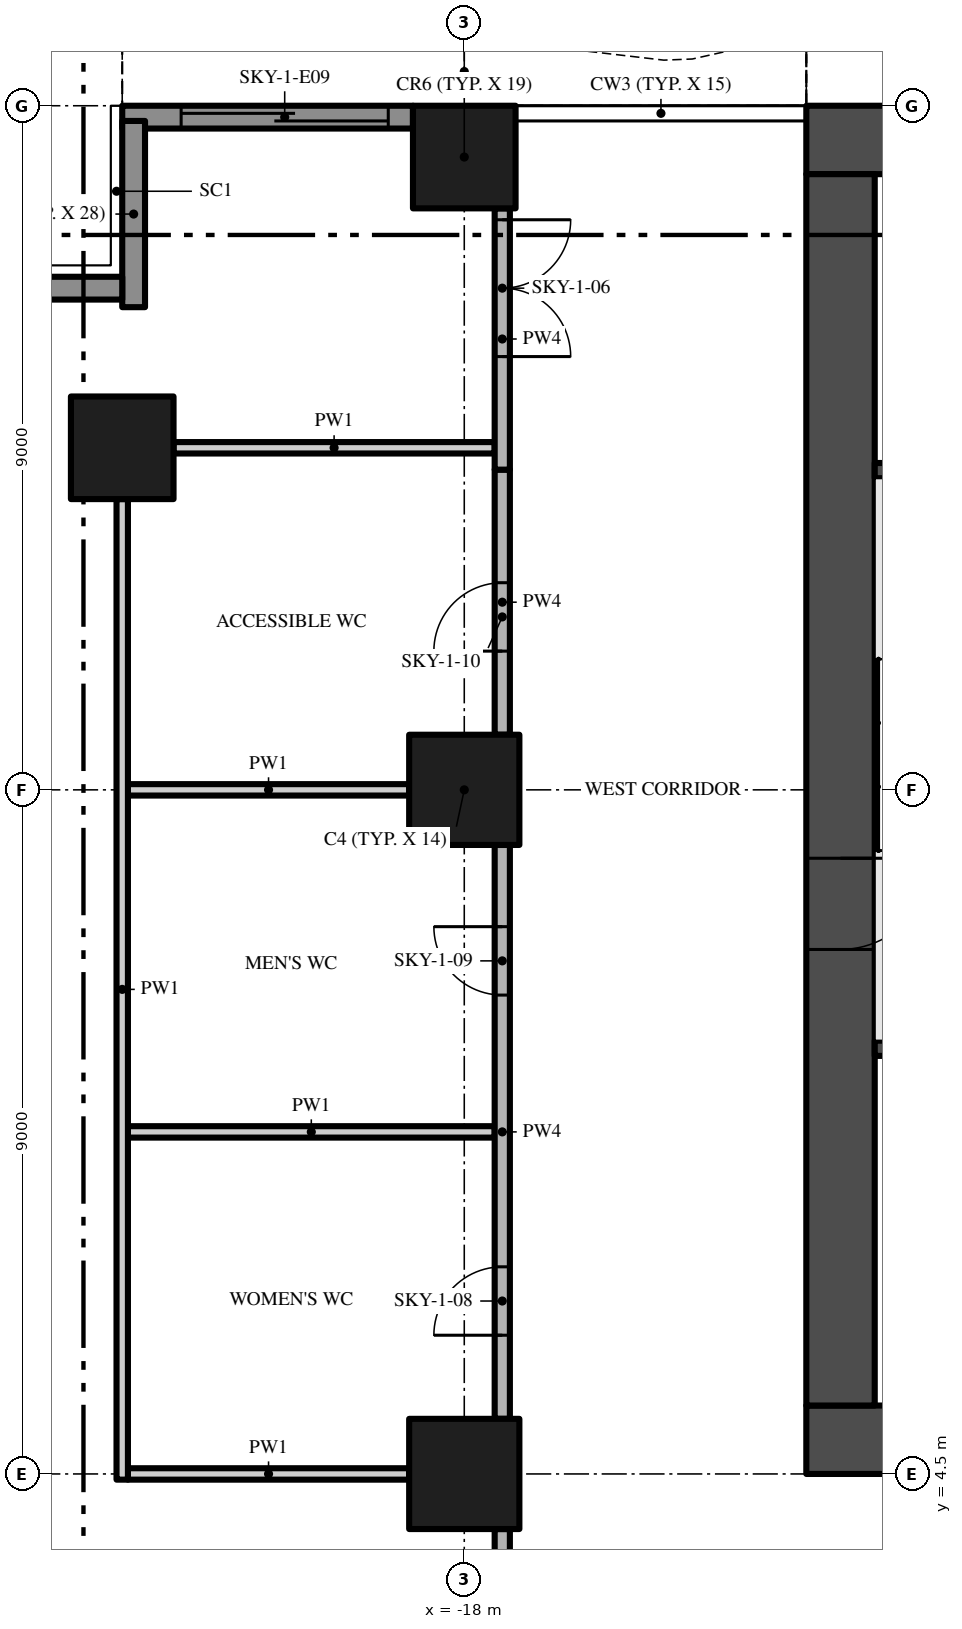
"""IFC4 building model, lengths in metres.
Left out: names, types, materials, properties, quantities, classifications, styles, units other than length and angle.
Written with IfcOpenShell. Run it as: python <this file> out.ifc"""

import sys

from ifc_helpers import new_model, si_unit, direction, frame, frame_2d, origin, origin_2d, place, context, subcontext, project, spatial, polyline, rectangle, outline, extrude, element, fill, save


model = new_model("IFC4")
c1 = context("Model", 3, precision=1e-05, world=origin(), true_north=direction((0.0, 1.0)))
c2 = subcontext(c1, "Body", "Model", "MODEL_VIEW")
j1 = project(units=[si_unit("LENGTHUNIT", "METRE"), si_unit("PLANEANGLEUNIT", "RADIAN")], contexts=[c1])
p1 = place(None, origin())
s1 = spatial("IfcSite", under=j1, at=p1, CompositionType="ELEMENT")
p2 = place(p1, origin())
s2 = spatial("IfcBuilding", under=s1, at=p2, CompositionType="ELEMENT")
p3 = place(p2, frame((0.0, 0.0, 64.4)))
s3 = spatial("IfcBuildingStorey", under=s2, at=p3, CompositionType="ELEMENT", Elevation=64.4)
p4 = place(p3, frame((-13.5, 4.95, -0.3), z_axis=(0.0, 0.0, 1.0), x_axis=(1.0, 0.0, 0.0)))
e1 = element("IfcWall", 1, at=p4, inside=s3, PredefinedType="SHEAR", context=c2, shape_type="SweptSolid", body=[
    extrude(rectangle(XDim=27.0, YDim=0.9, at=frame_2d((13.5, 0.0))), origin(), (0.0, 0.0, 1.0), 5.0),
])
p5 = place(p4, frame((12.0, 0.0, 0.3)))
e2 = element("IfcOpeningElement", 2, at=p5, cuts=e1, PredefinedType="OPENING", context=c2, shape_type="SweptSolid", body=[
    extrude(rectangle(XDim=3.0, YDim=2.4, at=frame_2d((1.5, 1.2))), frame((0.0, 0.46, 0.0), z_axis=(0.0, -1.0, 0.0), x_axis=(1.0, 0.0, 0.0)), (0.0, 0.0, 1.0), 0.92),
])
p6 = place(p4, frame((4.9, 0.0, 0.3)))
e3 = element("IfcOpeningElement", 3, at=p6, cuts=e1, PredefinedType="OPENING", context=c2, shape_type="SweptSolid", body=[
    extrude(rectangle(XDim=1.2, YDim=2.2, at=frame_2d((0.6, 1.1))), frame((0.0, 0.46, 0.0), z_axis=(0.0, -1.0, 0.0), x_axis=(1.0, 0.0, 0.0)), (0.0, 0.0, 1.0), 0.92),
])
p7 = place(p4, frame((20.75, 0.0, 0.3)))
e4 = element("IfcOpeningElement", 4, at=p7, cuts=e1, PredefinedType="OPENING", context=c2, shape_type="SweptSolid", body=[
    extrude(rectangle(XDim=1.5, YDim=2.2, at=frame_2d((0.75, 1.1))), frame((0.0, 0.46, 0.0), z_axis=(0.0, -1.0, 0.0), x_axis=(1.0, 0.0, 0.0)), (0.0, 0.0, 1.0), 0.92),
])
p8 = place(p4, frame((17.4, 0.0, 0.3)))
e5 = element("IfcOpeningElement", 5, at=p8, cuts=e1, PredefinedType="OPENING", context=c2, shape_type="SweptSolid", body=[
    extrude(rectangle(XDim=1.2, YDim=2.2, at=frame_2d((0.6, 1.1))), frame((0.0, 0.46, 0.0), z_axis=(0.0, -1.0, 0.0), x_axis=(1.0, 0.0, 0.0)), (0.0, 0.0, 1.0), 0.92),
])
p9 = place(p3, frame((13.5, 22.05, -0.3), z_axis=(0.0, 0.0, 1.0), x_axis=(-1.0, 0.0, 0.0)))
e6 = element("IfcWall", 6, at=p9, inside=s3, PredefinedType="SHEAR", context=c2, shape_type="SweptSolid", body=[
    extrude(rectangle(XDim=27.0, YDim=0.9, at=frame_2d((13.5, 0.0))), origin(), (0.0, 0.0, 1.0), 5.0),
])
p10 = place(p3, frame((-13.05, 21.6, -0.3), z_axis=(0.0, 0.0, 1.0), x_axis=(0.0, -1.0, 0.0)))
e7 = element("IfcWall", 7, at=p10, inside=s3, PredefinedType="SHEAR", context=c2, shape_type="SweptSolid", body=[
    extrude(rectangle(XDim=16.2, YDim=0.9, at=frame_2d((8.1, 0.0))), origin(), (0.0, 0.0, 1.0), 5.0),
])
p11 = place(p10, frame((9.0, 0.0, 0.3)))
e8 = element("IfcOpeningElement", 8, at=p11, cuts=e7, PredefinedType="OPENING", context=c2, shape_type="SweptSolid", body=[
    extrude(rectangle(XDim=1.2, YDim=2.2, at=frame_2d((0.6, 1.1))), frame((0.0, 0.46, 0.0), z_axis=(0.0, -1.0, 0.0), x_axis=(1.0, 0.0, 0.0)), (0.0, 0.0, 1.0), 0.92),
])
p12 = place(p3, frame((-18.0, 13.5, 0.0), z_axis=(0.0, 0.0, 1.0), x_axis=(1.0, 0.0, 0.0)))
e9 = element("IfcColumn", 9, at=p12, inside=s3, PredefinedType="COLUMN", context=c2, shape_type="SweptSolid", body=[
    extrude(rectangle(XDim=1.45, YDim=1.45, at=origin_2d()), origin(), (0.0, 0.0, 1.0), 4.7),
])
p13 = place(p3, frame((-18.0, 21.825, 0.0), z_axis=(0.0, 0.0, 1.0), x_axis=(1.0, 0.0, 0.0)))
e10 = element("IfcColumn", 10, at=p13, inside=s3, PredefinedType="COLUMN", context=c2, shape_type="SweptSolid", body=[
    extrude(rectangle(XDim=1.35, YDim=1.35, at=origin_2d()), origin(), (0.0, 0.0, 1.0), 4.7),
])
p14 = place(p3, frame((-18.0, 4.5, 0.0), z_axis=(0.0, 0.0, 1.0), x_axis=(1.0, 0.0, 0.0)))
e11 = element("IfcColumn", 11, at=p14, inside=s3, PredefinedType="COLUMN", context=c2, shape_type="SweptSolid", body=[
    extrude(rectangle(XDim=1.45, YDim=1.45, at=origin_2d()), origin(), (0.0, 0.0, 1.0), 4.7),
])
p15 = place(p3, frame((-22.5, 18.0, 0.0), z_axis=(0.0, 0.0, 1.0), x_axis=(1.0, 0.0, 0.0)))
e12 = element("IfcColumn", 12, at=p15, inside=s3, PredefinedType="COLUMN", context=c2, shape_type="SweptSolid", body=[
    extrude(rectangle(XDim=1.35, YDim=1.35, at=origin_2d()), origin(), (0.0, 0.0, 1.0), 4.7),
])
p16 = place(p3, frame((-22.5, 22.35, 0.0), z_axis=(0.0, 0.0, 1.0), x_axis=(1.0, 0.0, 0.0)))
e13 = element("IfcWall", 13, at=p16, inside=s3, PredefinedType="SOLIDWALL", context=c2, shape_type="SweptSolid", body=[
    extrude(rectangle(XDim=3.825, YDim=0.3, at=frame_2d((1.913, 0.0))), origin(), (0.0, 0.0, 1.0), 4.7),
])
p17 = place(p16, frame((0.775, 0.0, 0.0)))
e14 = element("IfcOpeningElement", 14, at=p17, cuts=e13, PredefinedType="OPENING", context=c2, shape_type="SweptSolid", body=[
    extrude(rectangle(XDim=2.725, YDim=2.4, at=frame_2d((1.363, 1.2))), frame((0.0, 0.16, 0.0), z_axis=(0.0, -1.0, 0.0), x_axis=(1.0, 0.0, 0.0)), (0.0, 0.0, 1.0), 0.32),
])
p18 = place(p3, frame((-22.35, 19.85, 0.0), z_axis=(0.0, 0.0, 1.0), x_axis=(0.0, 1.0, 0.0)))
e15 = element("IfcWall", 15, at=p18, inside=s3, PredefinedType="SOLIDWALL", context=c2, shape_type="SweptSolid", body=[
    extrude(rectangle(XDim=2.45, YDim=0.3, at=frame_2d((1.225, 0.0))), origin(), (0.0, 0.0, 1.0), 4.7),
])
p19 = place(p3, frame((-24.75, 20.1, 0.0), z_axis=(0.0, 0.0, 1.0), x_axis=(1.0, 0.0, 0.0)))
e16 = element("IfcWall", 16, at=p19, inside=s3, PredefinedType="SOLIDWALL", context=c2, shape_type="SweptSolid", body=[
    extrude(rectangle(XDim=2.25, YDim=0.3, at=frame_2d((1.125, 0.0))), origin(), (0.0, 0.0, 1.0), 4.7),
])
p20 = place(p3, origin())
e17 = element("IfcWall", 17, at=p20, inside=s3, PredefinedType="USERDEFINED", context=c2, shape_type="SweptSolid", body=[
    extrude(outline(polyline([(-13.5, 23.451), (-15.0, 23.115), (-15.375, 23.1), (-16.5, 23.231), (-18.0, 23.755), (-19.5, 24.488), (-21.0, 25.149), (-22.5, 25.485), (-22.555, 25.241), (-21.079, 24.91), (-19.605, 24.261), (-18.096, 23.524), (-16.556, 22.986), (-15.385, 22.849), (-14.967, 22.866), (-13.445, 23.208), (-13.5, 23.451)])), origin(), (0.0, 0.0, 1.0), 0.9),
])
for number, where, z_axis, x_axis in (
    (18, (-12.6, 10.1, 0.0), (0.0, 0.0, 1.0), (1.0, 0.0, 0.0)),
    (19, (-12.6, 17.7, 0.0), (0.0, 0.0, 1.0), (1.0, 0.0, 0.0)),
):
    element("IfcWall", number, at=place(p3, frame(where, z_axis=z_axis, x_axis=x_axis)), inside=s3, PredefinedType="SHEAR", context=c2, shape_type="SweptSolid", body=[
        extrude(rectangle(XDim=2.95, YDim=0.2, at=frame_2d((1.475, 0.0))), origin(), (0.0, 0.0, 1.0), 4.7),
    ])
p21 = place(p3, frame((-22.425, 4.5, 0.0), z_axis=(0.0, 0.0, 1.0), x_axis=(1.0, 0.0, 0.0)))
e20 = element("IfcWall", 20, at=p21, inside=s3, PredefinedType="PARTITIONING", context=c2, shape_type="SweptSolid", body=[
    extrude(rectangle(XDim=3.7, YDim=0.15, at=frame_2d((1.85, 0.0))), origin(), (0.0, 0.0, 1.0), 4.7),
])
p22 = place(p3, frame((-22.425, 9.0, 0.0), z_axis=(0.0, 0.0, 1.0), x_axis=(1.0, 0.0, 0.0)))
e21 = element("IfcWall", 21, at=p22, inside=s3, PredefinedType="PARTITIONING", context=c2, shape_type="SweptSolid", body=[
    extrude(rectangle(XDim=4.825, YDim=0.15, at=frame_2d((2.413, 0.0))), origin(), (0.0, 0.0, 1.0), 4.7),
])
p23 = place(p3, frame((-22.425, 13.5, 0.0), z_axis=(0.0, 0.0, 1.0), x_axis=(1.0, 0.0, 0.0)))
e22 = element("IfcWall", 22, at=p23, inside=s3, PredefinedType="PARTITIONING", context=c2, shape_type="SweptSolid", body=[
    extrude(rectangle(XDim=3.7, YDim=0.15, at=frame_2d((1.85, 0.0))), origin(), (0.0, 0.0, 1.0), 4.7),
])
p24 = place(p3, frame((-21.825, 18.0, 0.0), z_axis=(0.0, 0.0, 1.0), x_axis=(1.0, 0.0, 0.0)))
e23 = element("IfcWall", 23, at=p24, inside=s3, PredefinedType="PARTITIONING", context=c2, shape_type="SweptSolid", body=[
    extrude(rectangle(XDim=4.225, YDim=0.15, at=frame_2d((2.112, 0.0))), origin(), (0.0, 0.0, 1.0), 4.7),
])
p25 = place(p3, frame((-22.5, 4.425, 0.0), z_axis=(0.0, 0.0, 1.0), x_axis=(0.0, 1.0, 0.0)))
e24 = element("IfcWall", 24, at=p25, inside=s3, PredefinedType="PARTITIONING", context=c2, shape_type="SweptSolid", body=[
    extrude(rectangle(XDim=12.9, YDim=0.15, at=frame_2d((6.45, 0.0))), origin(), (0.0, 0.0, 1.0), 4.7),
])
p26 = place(p3, frame((-17.5, 3.775, 0.0), z_axis=(0.0, 0.0, 1.0), x_axis=(0.0, -1.0, 0.0)))
e25 = element("IfcWall", 25, at=p26, inside=s3, PredefinedType="PARTITIONING", context=c2, shape_type="SweptSolid", body=[
    extrude(rectangle(XDim=3.95, YDim=0.2, at=frame_2d((1.975, 0.0))), origin(), (0.0, 0.0, 1.0), 4.7),
])
p27 = place(p26, frame((0.625, 0.0, 0.0)))
e26 = element("IfcOpeningElement", 26, at=p27, cuts=e25, PredefinedType="OPENING", context=c2, shape_type="SweptSolid", body=[
    extrude(rectangle(XDim=1.8, YDim=2.4, at=frame_2d((0.9, 1.2))), frame((0.0, 0.11, 0.0), z_axis=(0.0, -1.0, 0.0), x_axis=(1.0, 0.0, 0.0)), (0.0, 0.0, 1.0), 0.22),
])
p28 = place(p3, frame((-17.5, 5.225, 0.0), z_axis=(0.0, 0.0, 1.0), x_axis=(0.0, 1.0, 0.0)))
e27 = element("IfcWall", 27, at=p28, inside=s3, PredefinedType="PARTITIONING", context=c2, shape_type="SweptSolid", body=[
    extrude(rectangle(XDim=7.55, YDim=0.2, at=frame_2d((3.775, 0.0))), origin(), (0.0, 0.0, 1.0), 4.7),
])
p29 = place(p28, frame((1.1, 0.0, 0.0)))
e28 = element("IfcOpeningElement", 28, at=p29, cuts=e27, PredefinedType="OPENING", context=c2, shape_type="SweptSolid", body=[
    extrude(rectangle(XDim=0.9, YDim=2.1, at=frame_2d((0.45, 1.05))), frame((0.0, 0.11, 0.0), z_axis=(0.0, -1.0, 0.0), x_axis=(1.0, 0.0, 0.0)), (0.0, 0.0, 1.0), 0.22),
])
p30 = place(p28, frame((5.575, 0.0, 0.0)))
e29 = element("IfcOpeningElement", 29, at=p30, cuts=e27, PredefinedType="OPENING", context=c2, shape_type="SweptSolid", body=[
    extrude(rectangle(XDim=0.9, YDim=2.1, at=frame_2d((0.45, 1.05))), frame((0.0, 0.11, 0.0), z_axis=(0.0, -1.0, 0.0), x_axis=(1.0, 0.0, 0.0)), (0.0, 0.0, 1.0), 0.22),
])
p31 = place(p3, frame((-17.5, 14.225, 0.0), z_axis=(0.0, 0.0, 1.0), x_axis=(0.0, 1.0, 0.0)))
e30 = element("IfcWall", 30, at=p31, inside=s3, PredefinedType="PARTITIONING", context=c2, shape_type="SweptSolid", body=[
    extrude(rectangle(XDim=3.487, YDim=0.2, at=frame_2d((1.744, 0.0))), origin(), (0.0, 0.0, 1.0), 4.7),
])
p32 = place(p31, frame((1.1, 0.0, 0.0)))
e31 = element("IfcOpeningElement", 31, at=p32, cuts=e30, PredefinedType="OPENING", context=c2, shape_type="SweptSolid", body=[
    extrude(rectangle(XDim=0.9, YDim=2.1, at=frame_2d((0.45, 1.05))), frame((0.0, 0.11, 0.0), z_axis=(0.0, -1.0, 0.0), x_axis=(1.0, 0.0, 0.0)), (0.0, 0.0, 1.0), 0.22),
])
p33 = place(p3, frame((-17.5, 21.15, 0.0), z_axis=(0.0, 0.0, 1.0), x_axis=(0.0, -1.0, 0.0)))
e32 = element("IfcWall", 32, at=p33, inside=s3, PredefinedType="PARTITIONING", context=c2, shape_type="SweptSolid", body=[
    extrude(rectangle(XDim=3.438, YDim=0.2, at=frame_2d((1.719, 0.0))), origin(), (0.0, 0.0, 1.0), 4.7),
])
p34 = place(p33, frame((0.15, 0.0, 0.0)))
e33 = element("IfcOpeningElement", 33, at=p34, cuts=e32, PredefinedType="OPENING", context=c2, shape_type="SweptSolid", body=[
    extrude(rectangle(XDim=1.8, YDim=2.4, at=frame_2d((0.9, 1.2))), frame((0.0, 0.11, 0.0), z_axis=(0.0, -1.0, 0.0), x_axis=(1.0, 0.0, 0.0)), (0.0, 0.0, 1.0), 0.22),
])
p35 = place(p17, origin())
e34 = element("IfcDoor", 34, at=p35, inside=s3, OperationType="SINGLE_SWING_LEFT", PredefinedType="DOOR", context=c2, shape_type="SweptSolid", body=[
    extrude(rectangle(XDim=2.725, YDim=2.4, at=frame_2d((1.363, 1.2))), frame((0.0, 0.025, 0.0), z_axis=(0.0, -1.0, 0.0), x_axis=(1.0, 0.0, 0.0)), (0.0, 0.0, 1.0), 0.05),
])
fill(e14, e34)
p36 = place(p11, frame((1.2, 0.0, 0.0), z_axis=(0.0, 0.0, 1.0), x_axis=(-1.0, 0.0, 0.0)))
e35 = element("IfcDoor", 35, at=p36, inside=s3, OperationType="SINGLE_SWING_RIGHT", PredefinedType="DOOR", context=c2, shape_type="SweptSolid", body=[
    extrude(rectangle(XDim=1.2, YDim=2.2, at=frame_2d((0.6, 1.1))), frame((0.0, 0.025, 0.0), z_axis=(0.0, -1.0, 0.0), x_axis=(1.0, 0.0, 0.0)), (0.0, 0.0, 1.0), 0.05),
])
fill(e8, e35)
p37 = place(p34, origin())
e36 = element("IfcDoor", 36, at=p37, inside=s3, OperationType="DOUBLE_DOOR_SINGLE_SWING", PredefinedType="DOOR", context=c2, shape_type="SweptSolid", body=[
    extrude(rectangle(XDim=1.8, YDim=2.4, at=frame_2d((0.9, 1.2))), frame((0.0, 0.025, 0.0), z_axis=(0.0, -1.0, 0.0), x_axis=(1.0, 0.0, 0.0)), (0.0, 0.0, 1.0), 0.05),
])
fill(e33, e36)
p38 = place(p29, origin())
e37 = element("IfcDoor", 37, at=p38, inside=s3, OperationType="SINGLE_SWING_LEFT", PredefinedType="DOOR", context=c2, shape_type="SweptSolid", body=[
    extrude(rectangle(XDim=0.9, YDim=2.1, at=frame_2d((0.45, 1.05))), frame((0.0, 0.025, 0.0), z_axis=(0.0, -1.0, 0.0), x_axis=(1.0, 0.0, 0.0)), (0.0, 0.0, 1.0), 0.05),
])
fill(e28, e37)
p39 = place(p30, origin())
e38 = element("IfcDoor", 38, at=p39, inside=s3, OperationType="SINGLE_SWING_RIGHT", PredefinedType="DOOR", context=c2, shape_type="SweptSolid", body=[
    extrude(rectangle(XDim=0.9, YDim=2.1, at=frame_2d((0.45, 1.05))), frame((0.0, 0.025, 0.0), z_axis=(0.0, -1.0, 0.0), x_axis=(1.0, 0.0, 0.0)), (0.0, 0.0, 1.0), 0.05),
])
fill(e29, e38)
p40 = place(p32, origin())
e39 = element("IfcDoor", 39, at=p40, inside=s3, OperationType="SINGLE_SWING_LEFT", PredefinedType="DOOR", context=c2, shape_type="SweptSolid", body=[
    extrude(rectangle(XDim=0.9, YDim=2.1, at=frame_2d((0.45, 1.05))), frame((0.0, 0.025, 0.0), z_axis=(0.0, -1.0, 0.0), x_axis=(1.0, 0.0, 0.0)), (0.0, 0.0, 1.0), 0.05),
])
fill(e31, e39)
save(model, sys.argv[1])
